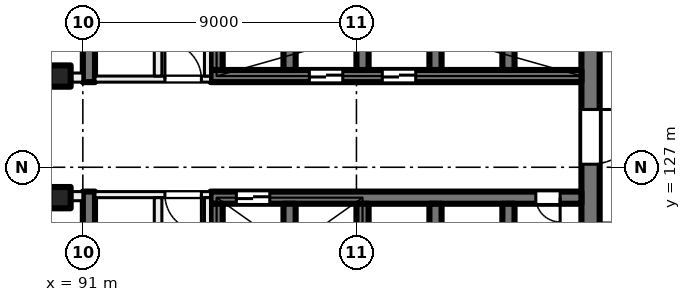
"""IFC4 building model, lengths in metres.
Left out: names, types, materials, properties, quantities, classifications, styles, units other than length and angle.
Written with IfcOpenShell. Run it as: python <this file> out.ifc"""

import sys

from ifc_helpers import new_model, si_unit, direction, frame, frame_2d, origin, origin_2d, place, context, subcontext, project, spatial, rectangle, extrude, element, fill, save


model = new_model("IFC4")
c1 = context("Model", 3, precision=1e-05, world=origin(), true_north=direction((0.0, 1.0)))
c2 = subcontext(c1, "Body", "Model", "MODEL_VIEW")
j1 = project(units=[si_unit("LENGTHUNIT", "METRE"), si_unit("PLANEANGLEUNIT", "RADIAN")], contexts=[c1])
p1 = place(None, origin())
s1 = spatial("IfcSite", under=j1, at=p1, CompositionType="ELEMENT")
p2 = place(p1, origin())
s2 = spatial("IfcBuilding", under=s1, at=p2, CompositionType="ELEMENT")
p3 = place(p2, frame((0.0, 0.0, 31.5)))
s3 = spatial("IfcBuildingStorey", under=s2, at=p3, CompositionType="ELEMENT", Elevation=31.5)
for number, where, z_axis, x_axis in (
    (1, (90.25, 130.0, 0.0), (0.0, 0.0, 1.0), (1.0, 0.0, 0.0)),
    (2, (90.25, 126.0, 0.0), (0.0, 0.0, 1.0), (1.0, 0.0, 0.0)),
):
    element("IfcColumn", number, at=place(p3, frame(where, z_axis=z_axis, x_axis=x_axis)), inside=s3, PredefinedType="COLUMN", context=c2, shape_type="SweptSolid", body=[
        extrude(rectangle(XDim=0.7, YDim=0.7, at=origin_2d()), origin(), (0.0, 0.0, 1.0), 4.0),
    ])
p4 = place(p3, frame((107.7, 135.2, 0.0), z_axis=(0.0, 0.0, 1.0), x_axis=(0.0, -1.0, 0.0)))
e3 = element("IfcWall", 3, at=p4, inside=s3, PredefinedType="SHEAR", context=c2, shape_type="SweptSolid", body=[
    extrude(rectangle(XDim=14.4, YDim=0.6, at=frame_2d((7.2, 0.0))), origin(), (0.0, 0.0, 1.0), 4.0),
])
p5 = place(p4, frame((6.3, 0.0, 0.0)))
e4 = element("IfcOpeningElement", 4, at=p5, cuts=e3, PredefinedType="OPENING", context=c2, shape_type="SweptSolid", body=[
    extrude(rectangle(XDim=1.8, YDim=2.1, at=frame_2d((0.9, 1.05))), frame((0.0, 0.31, 0.0), z_axis=(0.0, -1.0, 0.0), x_axis=(1.0, 0.0, 0.0)), (0.0, 0.0, 1.0), 0.62),
])
p6 = place(p3, frame((107.4, 130.0, 0.0), z_axis=(0.0, 0.0, 1.0), x_axis=(-1.0, 0.0, 0.0)))
e5 = element("IfcWall", 5, at=p6, inside=s3, PredefinedType="SHEAR", context=c2, shape_type="SweptSolid", body=[
    extrude(rectangle(XDim=12.2, YDim=0.4, at=frame_2d((6.1, 0.0))), origin(), (0.0, 0.0, 1.0), 4.0),
])
p7 = place(p6, frame((5.45, 0.0, 0.0)))
e6 = element("IfcOpeningElement", 6, at=p7, cuts=e5, PredefinedType="OPENING", context=c2, shape_type="SweptSolid", body=[
    extrude(rectangle(XDim=1.1, YDim=2.1, at=frame_2d((0.55, 1.05))), frame((0.0, 0.21, 0.0), z_axis=(0.0, -1.0, 0.0), x_axis=(1.0, 0.0, 0.0)), (0.0, 0.0, 1.0), 0.42),
])
p8 = place(p6, frame((7.85, 0.0, 0.0)))
e7 = element("IfcOpeningElement", 7, at=p8, cuts=e5, PredefinedType="OPENING", context=c2, shape_type="SweptSolid", body=[
    extrude(rectangle(XDim=1.1, YDim=2.1, at=frame_2d((0.55, 1.05))), frame((0.0, 0.21, 0.0), z_axis=(0.0, -1.0, 0.0), x_axis=(1.0, 0.0, 0.0)), (0.0, 0.0, 1.0), 0.42),
])
for number, where, z_axis, x_axis in (
    (8, (105.0, 133.2, 0.0), (0.0, 0.0, 1.0), (0.0, -1.0, 0.0)),
    (9, (102.6, 133.2, 0.0), (0.0, 0.0, 1.0), (0.0, -1.0, 0.0)),
    (10, (100.2, 133.2, 0.0), (0.0, 0.0, 1.0), (0.0, -1.0, 0.0)),
    (11, (97.8, 133.2, 0.0), (0.0, 0.0, 1.0), (0.0, -1.0, 0.0)),
    (12, (95.4, 133.2, 0.0), (0.0, 0.0, 1.0), (0.0, -1.0, 0.0)),
):
    element("IfcWall", number, at=place(p3, frame(where, z_axis=z_axis, x_axis=x_axis)), inside=s3, PredefinedType="SHEAR", context=c2, shape_type="SweptSolid", body=[
        extrude(rectangle(XDim=3.0, YDim=0.4, at=frame_2d((1.5, 0.0))), origin(), (0.0, 0.0, 1.0), 4.0),
    ])
p9 = place(p3, frame((107.4, 126.0, 0.0), z_axis=(0.0, 0.0, 1.0), x_axis=(-1.0, 0.0, 0.0)))
e13 = element("IfcWall", 13, at=p9, inside=s3, PredefinedType="SHEAR", context=c2, shape_type="SweptSolid", body=[
    extrude(rectangle(XDim=12.2, YDim=0.4, at=frame_2d((6.1, 0.0))), origin(), (0.0, 0.0, 1.0), 4.0),
])
p10 = place(p9, frame((10.25, 0.0, 0.0)))
e14 = element("IfcOpeningElement", 14, at=p10, cuts=e13, PredefinedType="OPENING", context=c2, shape_type="SweptSolid", body=[
    extrude(rectangle(XDim=1.1, YDim=2.1, at=frame_2d((0.55, 1.05))), frame((0.0, 0.21, 0.0), z_axis=(0.0, -1.0, 0.0), x_axis=(1.0, 0.0, 0.0)), (0.0, 0.0, 1.0), 0.42),
])
p11 = place(p9, frame((0.7, 0.0, 0.0)))
e15 = element("IfcOpeningElement", 15, at=p11, cuts=e13, PredefinedType="OPENING", context=c2, shape_type="SweptSolid", body=[
    extrude(rectangle(XDim=0.8, YDim=2.1, at=frame_2d((0.4, 1.05))), frame((0.0, 0.21, 0.0), z_axis=(0.0, -1.0, 0.0), x_axis=(1.0, 0.0, 0.0)), (0.0, 0.0, 1.0), 0.42),
])
for number, where, z_axis, x_axis in (
    (16, (105.0, 125.8, 0.0), (0.0, 0.0, 1.0), (0.0, -1.0, 0.0)),
    (17, (102.6, 125.8, 0.0), (0.0, 0.0, 1.0), (0.0, -1.0, 0.0)),
    (18, (100.2, 125.8, 0.0), (0.0, 0.0, 1.0), (0.0, -1.0, 0.0)),
    (19, (97.8, 125.8, 0.0), (0.0, 0.0, 1.0), (0.0, -1.0, 0.0)),
    (20, (95.4, 125.8, 0.0), (0.0, 0.0, 1.0), (0.0, -1.0, 0.0)),
):
    element("IfcWall", number, at=place(p3, frame(where, z_axis=z_axis, x_axis=x_axis)), inside=s3, PredefinedType="SHEAR", context=c2, shape_type="SweptSolid", body=[
        extrude(rectangle(XDim=3.0, YDim=0.4, at=frame_2d((1.5, 0.0))), origin(), (0.0, 0.0, 1.0), 4.0),
    ])
for number, where, z_axis, x_axis in (
    (21, (91.2, 138.4, 0.0), (0.0, 0.0, 1.0), (0.0, -1.0, 0.0)),
    (22, (91.2, 126.2, 0.0), (0.0, 0.0, 1.0), (0.0, -1.0, 0.0)),
):
    element("IfcWall", number, at=place(p3, frame(where, z_axis=z_axis, x_axis=x_axis)), inside=s3, PredefinedType="SHEAR", context=c2, shape_type="SweptSolid", body=[
        extrude(rectangle(XDim=8.6, YDim=0.4, at=frame_2d((4.3, 0.0))), origin(), (0.0, 0.0, 1.0), 4.0),
    ])
p12 = place(p3, frame((95.2, 126.1, 0.0), z_axis=(0.0, 0.0, 1.0), x_axis=(-1.0, 0.0, 0.0)))
e23 = element("IfcWall", 23, at=p12, inside=s3, PredefinedType="PARTITIONING", context=c2, shape_type="SweptSolid", body=[
    extrude(rectangle(XDim=3.8, YDim=0.2, at=frame_2d((1.9, 0.0))), origin(), (0.0, 0.0, 1.0), 3.625),
])
p13 = place(p12, frame((0.3, 0.0, 0.0)))
e24 = element("IfcOpeningElement", 24, at=p13, cuts=e23, PredefinedType="OPENING", context=c2, shape_type="SweptSolid", body=[
    extrude(rectangle(XDim=1.2, YDim=2.1, at=frame_2d((0.6, 1.05))), frame((0.0, 0.11, 0.0), z_axis=(0.0, -1.0, 0.0), x_axis=(1.0, 0.0, 0.0)), (0.0, 0.0, 1.0), 0.22),
])
p14 = place(p3, frame((95.1, 117.6, 0.0), z_axis=(0.0, 0.0, 1.0), x_axis=(0.0, 1.0, 0.0)))
e25 = element("IfcWall", 25, at=p14, inside=s3, PredefinedType="PARTITIONING", context=c2, shape_type="SweptSolid", body=[
    extrude(rectangle(XDim=8.4, YDim=0.2, at=frame_2d((4.2, 0.0))), origin(), (0.0, 0.0, 1.0), 3.625),
])
p15 = place(p14, frame((1.65, 0.0, 0.0)))
e26 = element("IfcOpeningElement", 26, at=p15, cuts=e25, PredefinedType="OPENING", context=c2, shape_type="SweptSolid", body=[
    extrude(rectangle(XDim=1.5, YDim=2.1, at=frame_2d((0.75, 1.05))), frame((0.0, 0.11, 0.0), z_axis=(0.0, -1.0, 0.0), x_axis=(1.0, 0.0, 0.0)), (0.0, 0.0, 1.0), 0.22),
])
p16 = place(p3, frame((93.475, 117.6, 0.0), z_axis=(0.0, 0.0, 1.0), x_axis=(0.0, 1.0, 0.0)))
e27 = element("IfcWall", 27, at=p16, inside=s3, PredefinedType="PARTITIONING", context=c2, shape_type="SweptSolid", body=[
    extrude(rectangle(XDim=8.4, YDim=0.25, at=frame_2d((4.2, 0.0))), origin(), (0.0, 0.0, 1.0), 3.625),
])
p17 = place(p16, frame((6.625, 0.0, 0.0)))
e28 = element("IfcOpeningElement", 28, at=p17, cuts=e27, PredefinedType="OPENING", context=c2, shape_type="SweptSolid", body=[
    extrude(rectangle(XDim=0.8, YDim=2.1, at=frame_2d((0.4, 1.05))), frame((0.0, 0.135, 0.0), z_axis=(0.0, -1.0, 0.0), x_axis=(1.0, 0.0, 0.0)), (0.0, 0.0, 1.0), 0.27),
])
p18 = place(p16, frame((2.375, 0.0, 0.0)))
e29 = element("IfcOpeningElement", 29, at=p18, cuts=e27, PredefinedType="OPENING", context=c2, shape_type="SweptSolid", body=[
    extrude(rectangle(XDim=0.8, YDim=2.1, at=frame_2d((0.4, 1.05))), frame((0.0, 0.135, 0.0), z_axis=(0.0, -1.0, 0.0), x_axis=(1.0, 0.0, 0.0)), (0.0, 0.0, 1.0), 0.27),
])
p19 = place(p3, frame((91.4, 129.9, 0.0), z_axis=(0.0, 0.0, 1.0), x_axis=(1.0, 0.0, 0.0)))
e30 = element("IfcWall", 30, at=p19, inside=s3, PredefinedType="PARTITIONING", context=c2, shape_type="SweptSolid", body=[
    extrude(rectangle(XDim=3.8, YDim=0.2, at=frame_2d((1.9, 0.0))), origin(), (0.0, 0.0, 1.0), 3.625),
])
p20 = place(p19, frame((2.3, 0.0, 0.0)))
e31 = element("IfcOpeningElement", 31, at=p20, cuts=e30, PredefinedType="OPENING", context=c2, shape_type="SweptSolid", body=[
    extrude(rectangle(XDim=1.2, YDim=2.1, at=frame_2d((0.6, 1.05))), frame((0.0, 0.11, 0.0), z_axis=(0.0, -1.0, 0.0), x_axis=(1.0, 0.0, 0.0)), (0.0, 0.0, 1.0), 0.22),
])
p21 = place(p3, frame((95.1, 130.0, 0.0), z_axis=(0.0, 0.0, 1.0), x_axis=(0.0, 1.0, 0.0)))
e32 = element("IfcWall", 32, at=p21, inside=s3, PredefinedType="PARTITIONING", context=c2, shape_type="SweptSolid", body=[
    extrude(rectangle(XDim=8.4, YDim=0.2, at=frame_2d((4.2, 0.0))), origin(), (0.0, 0.0, 1.0), 3.625),
])
p22 = place(p21, frame((5.25, 0.0, 0.0)))
e33 = element("IfcOpeningElement", 33, at=p22, cuts=e32, PredefinedType="OPENING", context=c2, shape_type="SweptSolid", body=[
    extrude(rectangle(XDim=1.5, YDim=2.1, at=frame_2d((0.75, 1.05))), frame((0.0, 0.11, 0.0), z_axis=(0.0, -1.0, 0.0), x_axis=(1.0, 0.0, 0.0)), (0.0, 0.0, 1.0), 0.22),
])
p23 = place(p3, frame((93.475, 130.0, 0.0), z_axis=(0.0, 0.0, 1.0), x_axis=(0.0, 1.0, 0.0)))
e34 = element("IfcWall", 34, at=p23, inside=s3, PredefinedType="PARTITIONING", context=c2, shape_type="SweptSolid", body=[
    extrude(rectangle(XDim=8.4, YDim=0.25, at=frame_2d((4.2, 0.0))), origin(), (0.0, 0.0, 1.0), 3.625),
])
p24 = place(p23, frame((3.8, 0.0, 0.0)))
e35 = element("IfcOpeningElement", 35, at=p24, cuts=e34, PredefinedType="OPENING", context=c2, shape_type="SweptSolid", body=[
    extrude(rectangle(XDim=0.8, YDim=2.1, at=frame_2d((0.4, 1.05))), frame((0.0, 0.135, 0.0), z_axis=(0.0, -1.0, 0.0), x_axis=(1.0, 0.0, 0.0)), (0.0, 0.0, 1.0), 0.27),
])
p25 = place(p3, frame((72.5, 129.95, 0.0), z_axis=(0.0, 0.0, 1.0), x_axis=(1.0, 0.0, 0.0)))
e36 = element("IfcWall", 36, at=p25, inside=s3, PredefinedType="PARTITIONING", context=c2, shape_type="SweptSolid", body=[
    extrude(rectangle(XDim=18.5, YDim=0.3, at=frame_2d((9.25, 0.0))), origin(), (0.0, 0.0, 1.0), 3.625),
])
p26 = place(p25, frame((10.475, 0.0, 0.0)))
e37 = element("IfcOpeningElement", 37, at=p26, cuts=e36, PredefinedType="OPENING", context=c2, shape_type="SweptSolid", body=[
    extrude(rectangle(XDim=1.8, YDim=2.1, at=frame_2d((0.9, 1.05))), frame((0.0, 0.16, 0.0), z_axis=(0.0, -1.0, 0.0), x_axis=(1.0, 0.0, 0.0)), (0.0, 0.0, 1.0), 0.32),
])
p27 = place(p25, frame((1.225, 0.0, 0.0)))
e38 = element("IfcOpeningElement", 38, at=p27, cuts=e36, PredefinedType="OPENING", context=c2, shape_type="SweptSolid", body=[
    extrude(rectangle(XDim=1.8, YDim=2.1, at=frame_2d((0.9, 1.05))), frame((0.0, 0.16, 0.0), z_axis=(0.0, -1.0, 0.0), x_axis=(1.0, 0.0, 0.0)), (0.0, 0.0, 1.0), 0.32),
])
p28 = place(p3, frame((91.0, 126.05, 0.0), z_axis=(0.0, 0.0, 1.0), x_axis=(-1.0, 0.0, 0.0)))
e39 = element("IfcWall", 39, at=p28, inside=s3, PredefinedType="PARTITIONING", context=c2, shape_type="SweptSolid", body=[
    extrude(rectangle(XDim=43.785, YDim=0.3, at=frame_2d((21.893, 0.0))), origin(), (0.0, 0.0, 1.0), 3.625),
])
p29 = place(p28, frame((2.125, 0.0, 0.0)))
e40 = element("IfcOpeningElement", 40, at=p29, cuts=e39, PredefinedType="OPENING", context=c2, shape_type="SweptSolid", body=[
    extrude(rectangle(XDim=1.0, YDim=2.1, at=frame_2d((0.5, 1.05))), frame((0.0, 0.16, 0.0), z_axis=(0.0, -1.0, 0.0), x_axis=(1.0, 0.0, 0.0)), (0.0, 0.0, 1.0), 0.32),
])
p30 = place(p28, frame((7.0, 0.0, 0.0)))
e41 = element("IfcOpeningElement", 41, at=p30, cuts=e39, PredefinedType="OPENING", context=c2, shape_type="SweptSolid", body=[
    extrude(rectangle(XDim=1.0, YDim=2.1, at=frame_2d((0.5, 1.05))), frame((0.0, 0.16, 0.0), z_axis=(0.0, -1.0, 0.0), x_axis=(1.0, 0.0, 0.0)), (0.0, 0.0, 1.0), 0.32),
])
p31 = place(p28, frame((11.5, 0.0, 0.0)))
e42 = element("IfcOpeningElement", 42, at=p31, cuts=e39, PredefinedType="OPENING", context=c2, shape_type="SweptSolid", body=[
    extrude(rectangle(XDim=1.0, YDim=2.1, at=frame_2d((0.5, 1.05))), frame((0.0, 0.16, 0.0), z_axis=(0.0, -1.0, 0.0), x_axis=(1.0, 0.0, 0.0)), (0.0, 0.0, 1.0), 0.32),
])
p32 = place(p28, frame((21.35, 0.0, 0.0)))
e43 = element("IfcOpeningElement", 43, at=p32, cuts=e39, PredefinedType="OPENING", context=c2, shape_type="SweptSolid", body=[
    extrude(rectangle(XDim=0.8, YDim=2.1, at=frame_2d((0.4, 1.05))), frame((0.0, 0.16, 0.0), z_axis=(0.0, -1.0, 0.0), x_axis=(1.0, 0.0, 0.0)), (0.0, 0.0, 1.0), 0.32),
])
p33 = place(p28, frame((16.75, 0.0, 0.0)))
e44 = element("IfcOpeningElement", 44, at=p33, cuts=e39, PredefinedType="OPENING", context=c2, shape_type="SweptSolid", body=[
    extrude(rectangle(XDim=1.0, YDim=2.1, at=frame_2d((0.5, 1.05))), frame((0.0, 0.16, 0.0), z_axis=(0.0, -1.0, 0.0), x_axis=(1.0, 0.0, 0.0)), (0.0, 0.0, 1.0), 0.32),
])
p34 = place(p28, frame((25.0, 0.0, 0.0)))
e45 = element("IfcOpeningElement", 45, at=p34, cuts=e39, PredefinedType="OPENING", context=c2, shape_type="SweptSolid", body=[
    extrude(rectangle(XDim=1.0, YDim=2.1, at=frame_2d((0.5, 1.05))), frame((0.0, 0.16, 0.0), z_axis=(0.0, -1.0, 0.0), x_axis=(1.0, 0.0, 0.0)), (0.0, 0.0, 1.0), 0.32),
])
p35 = place(p28, frame((39.296, 0.0, 0.0)))
e46 = element("IfcOpeningElement", 46, at=p35, cuts=e39, PredefinedType="OPENING", context=c2, shape_type="SweptSolid", body=[
    extrude(rectangle(XDim=1.8, YDim=2.1, at=frame_2d((0.9, 1.05))), frame((0.0, 0.16, 0.0), z_axis=(0.0, -1.0, 0.0), x_axis=(1.0, 0.0, 0.0)), (0.0, 0.0, 1.0), 0.32),
])
p36 = place(p10, origin())
e47 = element("IfcDoor", 47, at=p36, inside=s3, OperationType="DOUBLE_DOOR_SLIDING", PredefinedType="DOOR", context=c2, shape_type="SweptSolid", body=[
    extrude(rectangle(XDim=1.1, YDim=2.1, at=frame_2d((0.55, 1.05))), frame((0.0, 0.025, 0.0), z_axis=(0.0, -1.0, 0.0), x_axis=(1.0, 0.0, 0.0)), (0.0, 0.0, 1.0), 0.05),
])
fill(e14, e47)
p37 = place(p7, origin())
e48 = element("IfcDoor", 48, at=p37, inside=s3, OperationType="DOUBLE_DOOR_SLIDING", PredefinedType="DOOR", context=c2, shape_type="SweptSolid", body=[
    extrude(rectangle(XDim=1.1, YDim=2.1, at=frame_2d((0.55, 1.05))), frame((0.0, 0.025, 0.0), z_axis=(0.0, -1.0, 0.0), x_axis=(1.0, 0.0, 0.0)), (0.0, 0.0, 1.0), 0.05),
])
fill(e6, e48)
p38 = place(p8, origin())
e49 = element("IfcDoor", 49, at=p38, inside=s3, OperationType="DOUBLE_DOOR_SLIDING", PredefinedType="DOOR", context=c2, shape_type="SweptSolid", body=[
    extrude(rectangle(XDim=1.1, YDim=2.1, at=frame_2d((0.55, 1.05))), frame((0.0, 0.025, 0.0), z_axis=(0.0, -1.0, 0.0), x_axis=(1.0, 0.0, 0.0)), (0.0, 0.0, 1.0), 0.05),
])
fill(e7, e49)
p39 = place(p11, origin())
e50 = element("IfcDoor", 50, at=p39, inside=s3, OperationType="SINGLE_SWING_LEFT", PredefinedType="DOOR", context=c2, shape_type="SweptSolid", body=[
    extrude(rectangle(XDim=0.8, YDim=2.1, at=frame_2d((0.4, 1.05))), frame((0.0, 0.025, 0.0), z_axis=(0.0, -1.0, 0.0), x_axis=(1.0, 0.0, 0.0)), (0.0, 0.0, 1.0), 0.05),
])
fill(e15, e50)
p40 = place(p13, origin())
e51 = element("IfcDoor", 51, at=p40, inside=s3, OperationType="DOUBLE_DOOR_SINGLE_SWING", PredefinedType="DOOR", context=c2, shape_type="SweptSolid", body=[
    extrude(rectangle(XDim=1.2, YDim=2.1, at=frame_2d((0.6, 1.05))), frame((0.0, 0.025, 0.0), z_axis=(0.0, -1.0, 0.0), x_axis=(1.0, 0.0, 0.0)), (0.0, 0.0, 1.0), 0.05),
])
fill(e24, e51)
p41 = place(p20, origin())
e52 = element("IfcDoor", 52, at=p41, inside=s3, OperationType="DOUBLE_DOOR_SINGLE_SWING", PredefinedType="DOOR", context=c2, shape_type="SweptSolid", body=[
    extrude(rectangle(XDim=1.2, YDim=2.1, at=frame_2d((0.6, 1.05))), frame((0.0, 0.025, 0.0), z_axis=(0.0, -1.0, 0.0), x_axis=(1.0, 0.0, 0.0)), (0.0, 0.0, 1.0), 0.05),
])
fill(e31, e52)
p42 = place(p5, origin())
e53 = element("IfcDoor", 53, at=p42, inside=s3, OperationType="DOUBLE_DOOR_SINGLE_SWING", PredefinedType="DOOR", context=c2, shape_type="SweptSolid", body=[
    extrude(rectangle(XDim=1.8, YDim=2.1, at=frame_2d((0.9, 1.05))), frame((0.0, 0.025, 0.0), z_axis=(0.0, -1.0, 0.0), x_axis=(1.0, 0.0, 0.0)), (0.0, 0.0, 1.0), 0.05),
])
fill(e4, e53)
save(model, sys.argv[1])
